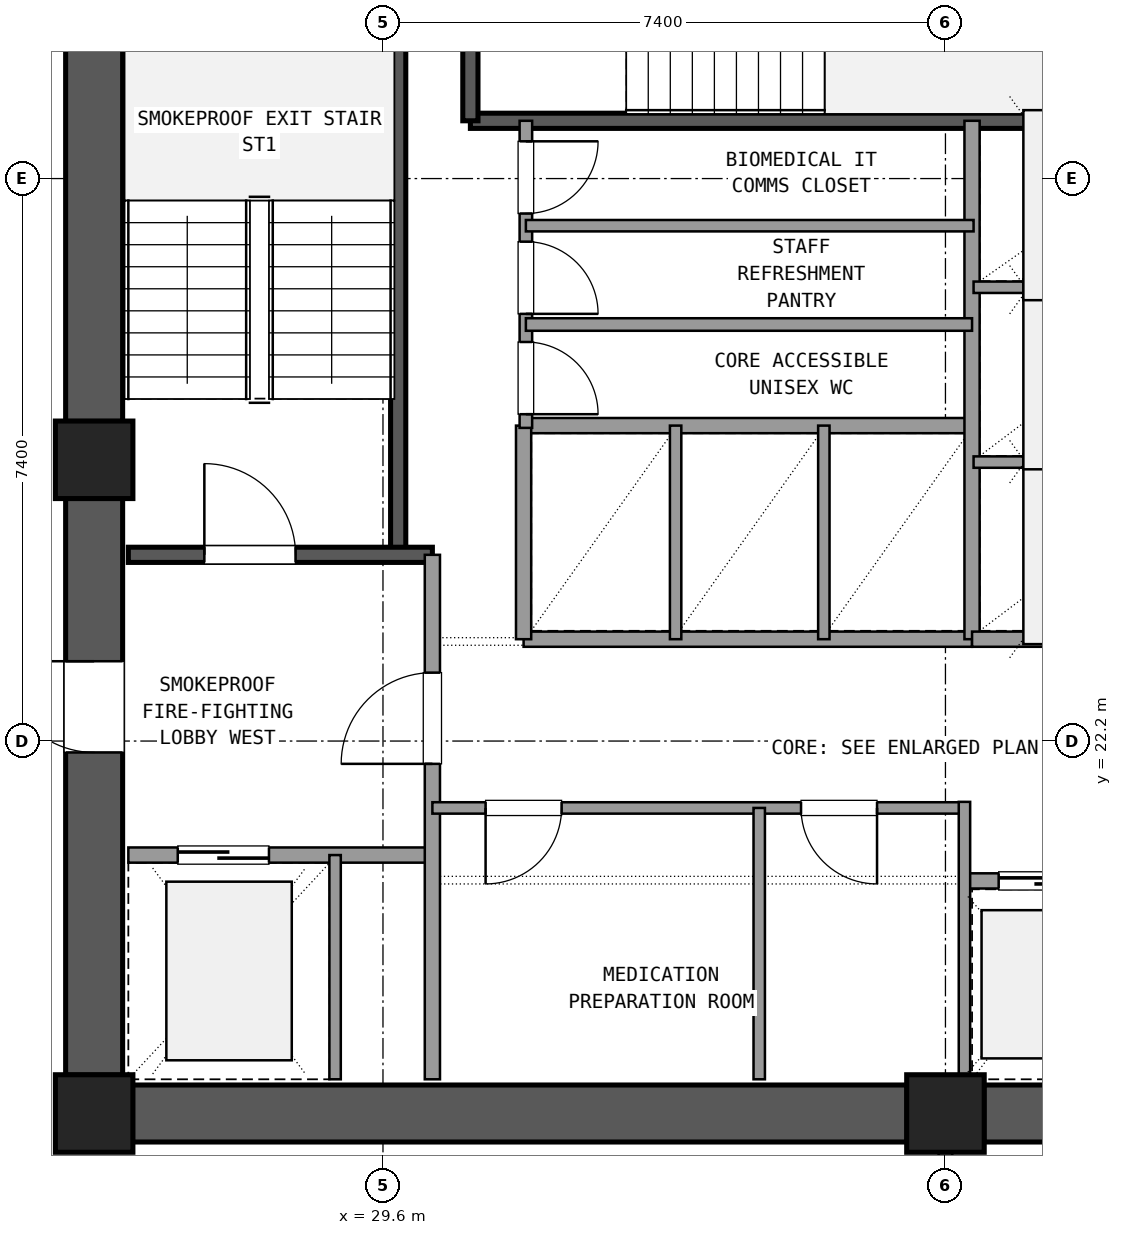
"""IFC4 building model, lengths in metres.
Left out: names, types, materials, properties, quantities, classifications, styles, units other than length and angle.
Written with IfcOpenShell. Run it as: python <this file> out.ifc"""

import sys

from ifc_helpers import new_model, si_unit, direction, frame, frame_2d, origin, origin_2d, place, context, subcontext, project, spatial, rectangle, extrude, element, fill, save


model = new_model("IFC4")
c1 = context("Model", 3, precision=1e-05, world=origin(), true_north=direction((0.0, 1.0)))
c2 = subcontext(c1, "Body", "Model", "MODEL_VIEW")
j1 = project(units=[si_unit("LENGTHUNIT", "METRE"), si_unit("PLANEANGLEUNIT", "RADIAN")], contexts=[c1])
p1 = place(None, origin())
s1 = spatial("IfcSite", under=j1, at=p1, CompositionType="ELEMENT")
p2 = place(p1, origin())
s2 = spatial("IfcBuilding", under=s1, at=p2, CompositionType="ELEMENT")
p3 = place(p2, frame((0.0, 0.0, 109.98)))
s3 = spatial("IfcBuildingStorey", under=s2, at=p3, CompositionType="ELEMENT", Elevation=109.98)
for number, where, z_axis, x_axis in (
    (1, (25.8, 17.3, 0.0), (0.0, 0.0, 1.0), (1.0, 0.0, 0.0)),
    (2, (37.0, 17.3, 0.0), (0.0, 0.0, 1.0), (1.0, 0.0, 0.0)),
    (3, (25.8, 25.9, 0.0), (0.0, 0.0, 1.0), (1.0, 0.0, 0.0)),
):
    element("IfcColumn", number, at=place(p3, frame(where, z_axis=z_axis, x_axis=x_axis)), inside=s3, PredefinedType="COLUMN", context=c2, shape_type="SweptSolid", body=[
        extrude(rectangle(XDim=1.02, YDim=1.02, at=origin_2d()), origin(), (0.0, 0.0, 1.0), 3.6),
    ])
for number, where, z_axis, x_axis in (
    (4, (26.305, 17.3, 0.0), (0.0, 0.0, 1.0), (1.0, 0.0, 0.0)),
    (5, (37.505, 17.3, 0.0), (0.0, 0.0, 1.0), (1.0, 0.0, 0.0)),
):
    element("IfcWall", number, at=place(p3, frame(where, z_axis=z_axis, x_axis=x_axis)), inside=s3, PredefinedType="SHEAR", context=c2, shape_type="SweptSolid", body=[
        extrude(rectangle(XDim=10.19, YDim=0.75, at=frame_2d((5.095, 0.0))), origin(), (0.0, 0.0, 1.0), 3.32),
    ])
p4 = place(p3, frame((25.8, 33.995, 0.0), z_axis=(0.0, 0.0, 1.0), x_axis=(0.0, -1.0, 0.0)))
e6 = element("IfcWall", 6, at=p4, inside=s3, PredefinedType="SHEAR", context=c2, shape_type="SweptSolid", body=[
    extrude(rectangle(XDim=7.59, YDim=0.75, at=frame_2d((3.795, 0.0))), origin(), (0.0, 0.0, 1.0), 3.32),
])
p5 = place(p3, frame((25.8, 25.395, 0.0), z_axis=(0.0, 0.0, 1.0), x_axis=(0.0, -1.0, 0.0)))
e7 = element("IfcWall", 7, at=p5, inside=s3, PredefinedType="SHEAR", context=c2, shape_type="SweptSolid", body=[
    extrude(rectangle(XDim=7.59, YDim=0.75, at=frame_2d((3.795, 0.0))), origin(), (0.0, 0.0, 1.0), 3.32),
])
p6 = place(p5, frame((2.145, 0.0, 0.0)))
e8 = element("IfcOpeningElement", 8, at=p6, cuts=e7, PredefinedType="OPENING", context=c2, shape_type="SweptSolid", body=[
    extrude(rectangle(XDim=1.2, YDim=2.15, at=frame_2d((0.6, 1.075))), frame((0.0, 0.385, 0.0), z_axis=(0.0, -1.0, 0.0), x_axis=(1.0, 0.0, 0.0)), (0.0, 0.0, 1.0), 0.77),
])
p7 = place(p3, frame((29.8, 24.65, 0.0), z_axis=(0.0, 0.0, 1.0), x_axis=(0.0, 1.0, 0.0)))
e9 = element("IfcWall", 9, at=p7, inside=s3, PredefinedType="SHEAR", context=c2, shape_type="SweptSolid", body=[
    extrude(rectangle(XDim=9.4, YDim=0.2, at=frame_2d((4.7, 0.0))), origin(), (0.0, 0.0, 1.0), 3.32),
])
p8 = place(p3, frame((26.25, 24.65, 0.0), z_axis=(0.0, 0.0, 1.0), x_axis=(1.0, 0.0, 0.0)))
e10 = element("IfcWall", 10, at=p8, inside=s3, PredefinedType="SHEAR", context=c2, shape_type="SweptSolid", body=[
    extrude(rectangle(XDim=4.0, YDim=0.2, at=frame_2d((2.0, 0.0))), origin(), (0.0, 0.0, 1.0), 3.32),
])
p9 = place(p8, frame((1.0, 0.0, 0.0)))
e11 = element("IfcOpeningElement", 11, at=p9, cuts=e10, PredefinedType="OPENING", context=c2, shape_type="SweptSolid", body=[
    extrude(rectangle(XDim=1.2, YDim=2.15, at=frame_2d((0.6, 1.075))), frame((0.0, 0.11, 0.0), z_axis=(0.0, -1.0, 0.0), x_axis=(1.0, 0.0, 0.0)), (0.0, 0.0, 1.0), 0.22),
])
p10 = place(p3, frame((30.75, 30.36, 0.0), z_axis=(0.0, 0.0, 1.0), x_axis=(1.0, 0.0, 0.0)))
e12 = element("IfcWall", 12, at=p10, inside=s3, PredefinedType="SHEAR", context=c2, shape_type="SweptSolid", body=[
    extrude(rectangle(XDim=9.5, YDim=0.2, at=frame_2d((4.75, 0.0))), origin(), (0.0, 0.0, 1.0), 3.32),
])
p11 = place(p3, frame((30.75, 30.36, 0.0), z_axis=(0.0, 0.0, 1.0), x_axis=(0.0, 1.0, 0.0)))
e13 = element("IfcWall", 13, at=p11, inside=s3, PredefinedType="SHEAR", context=c2, shape_type="SweptSolid", body=[
    extrude(rectangle(XDim=3.69, YDim=0.2, at=frame_2d((1.845, 0.0))), origin(), (0.0, 0.0, 1.0), 3.32),
])
p12 = place(p3, frame((26.25, 20.7, 0.0), z_axis=(0.0, 0.0, 1.0), x_axis=(1.0, 0.0, 0.0)))
e14 = element("IfcWall", 14, at=p12, inside=s3, PredefinedType="SOLIDWALL", context=c2, shape_type="SweptSolid", body=[
    extrude(rectangle(XDim=4.0, YDim=0.2, at=frame_2d((2.0, 0.0))), origin(), (0.0, 0.0, 1.0), 2.61),
])
p13 = place(p12, frame((0.65, 0.0, 0.0)))
e15 = element("IfcOpeningElement", 15, at=p13, cuts=e14, PredefinedType="OPENING", context=c2, shape_type="SweptSolid", body=[
    extrude(rectangle(XDim=1.2, YDim=2.15, at=frame_2d((0.6, 1.075))), frame((0.0, 0.11, 0.0), z_axis=(0.0, -1.0, 0.0), x_axis=(1.0, 0.0, 0.0)), (0.0, 0.0, 1.0), 0.22),
])
p14 = place(p3, frame((30.25, 17.75, 0.0), z_axis=(0.0, 0.0, 1.0), x_axis=(0.0, 1.0, 0.0)))
e16 = element("IfcWall", 16, at=p14, inside=s3, PredefinedType="SOLIDWALL", context=c2, shape_type="SweptSolid", body=[
    extrude(rectangle(XDim=6.9, YDim=0.2, at=frame_2d((3.45, 0.0))), origin(), (0.0, 0.0, 1.0), 2.61),
])
p15 = place(p14, frame((4.15, 0.0, 0.0)))
e17 = element("IfcOpeningElement", 17, at=p15, cuts=e16, PredefinedType="OPENING", context=c2, shape_type="SweptSolid", body=[
    extrude(rectangle(XDim=1.2, YDim=2.15, at=frame_2d((0.6, 1.075))), frame((0.0, 0.11, 0.0), z_axis=(0.0, -1.0, 0.0), x_axis=(1.0, 0.0, 0.0)), (0.0, 0.0, 1.0), 0.22),
])
p16 = place(p3, frame((28.97, 17.75, 0.0), z_axis=(0.0, 0.0, 1.0), x_axis=(0.0, 1.0, 0.0)))
e18 = element("IfcWall", 18, at=p16, inside=s3, PredefinedType="PARTITIONING", context=c2, shape_type="SweptSolid", body=[
    extrude(rectangle(XDim=2.95, YDim=0.15, at=frame_2d((1.475, 0.0))), origin(), (0.0, 0.0, 1.0), 2.61),
])
p17 = place(p3, frame((30.25, 21.32, 0.0), z_axis=(0.0, 0.0, 1.0), x_axis=(1.0, 0.0, 0.0)))
e19 = element("IfcWall", 19, at=p17, inside=s3, PredefinedType="PARTITIONING", context=c2, shape_type="SweptSolid", body=[
    extrude(rectangle(XDim=7.0, YDim=0.15, at=frame_2d((3.5, 0.0))), origin(), (0.0, 0.0, 1.0), 2.61),
])
p18 = place(p17, frame((0.7, 0.0, 0.0)))
e20 = element("IfcOpeningElement", 20, at=p18, cuts=e19, PredefinedType="OPENING", context=c2, shape_type="SweptSolid", body=[
    extrude(rectangle(XDim=1.0, YDim=2.15, at=frame_2d((0.5, 1.075))), frame((0.0, 0.085, 0.0), z_axis=(0.0, -1.0, 0.0), x_axis=(1.0, 0.0, 0.0)), (0.0, 0.0, 1.0), 0.17),
])
p19 = place(p17, frame((4.85, 0.0, 0.0)))
e21 = element("IfcOpeningElement", 21, at=p19, cuts=e19, PredefinedType="OPENING", context=c2, shape_type="SweptSolid", body=[
    extrude(rectangle(XDim=1.0, YDim=2.15, at=frame_2d((0.5, 1.075))), frame((0.0, 0.085, 0.0), z_axis=(0.0, -1.0, 0.0), x_axis=(1.0, 0.0, 0.0)), (0.0, 0.0, 1.0), 0.17),
])
p20 = place(p3, frame((34.55, 17.75, 0.0), z_axis=(0.0, 0.0, 1.0), x_axis=(0.0, 1.0, 0.0)))
e22 = element("IfcWall", 22, at=p20, inside=s3, PredefinedType="PARTITIONING", context=c2, shape_type="SweptSolid", body=[
    extrude(rectangle(XDim=3.57, YDim=0.15, at=frame_2d((1.785, 0.0))), origin(), (0.0, 0.0, 1.0), 2.61),
])
p21 = place(p3, frame((37.25, 20.36, 0.0), z_axis=(0.0, 0.0, 1.0), x_axis=(1.0, 0.0, 0.0)))
e23 = element("IfcWall", 23, at=p21, inside=s3, PredefinedType="SOLIDWALL", context=c2, shape_type="SweptSolid", body=[
    extrude(rectangle(XDim=6.1, YDim=0.2, at=frame_2d((3.05, 0.0))), origin(), (0.0, 0.0, 1.0), 2.61),
])
p22 = place(p21, frame((0.45, 0.0, 0.0)))
e24 = element("IfcOpeningElement", 24, at=p22, cuts=e23, PredefinedType="OPENING", context=c2, shape_type="SweptSolid", body=[
    extrude(rectangle(XDim=1.1, YDim=2.15, at=frame_2d((0.55, 1.075))), frame((0.0, 0.11, 0.0), z_axis=(0.0, -1.0, 0.0), x_axis=(1.0, 0.0, 0.0)), (0.0, 0.0, 1.0), 0.22),
])
p23 = place(p21, frame((2.5, 0.0, 0.0)))
e25 = element("IfcOpeningElement", 25, at=p23, cuts=e23, PredefinedType="OPENING", context=c2, shape_type="SweptSolid", body=[
    extrude(rectangle(XDim=1.1, YDim=2.15, at=frame_2d((0.55, 1.075))), frame((0.0, 0.11, 0.0), z_axis=(0.0, -1.0, 0.0), x_axis=(1.0, 0.0, 0.0)), (0.0, 0.0, 1.0), 0.22),
])
p24 = place(p21, frame((4.55, 0.0, 0.0)))
e26 = element("IfcOpeningElement", 26, at=p24, cuts=e23, PredefinedType="OPENING", context=c2, shape_type="SweptSolid", body=[
    extrude(rectangle(XDim=1.1, YDim=2.15, at=frame_2d((0.55, 1.075))), frame((0.0, 0.11, 0.0), z_axis=(0.0, -1.0, 0.0), x_axis=(1.0, 0.0, 0.0)), (0.0, 0.0, 1.0), 0.22),
])
p25 = place(p3, frame((37.25, 17.75, 0.0), z_axis=(0.0, 0.0, 1.0), x_axis=(0.0, 1.0, 0.0)))
e27 = element("IfcWall", 27, at=p25, inside=s3, PredefinedType="PARTITIONING", context=c2, shape_type="SweptSolid", body=[
    extrude(rectangle(XDim=3.65, YDim=0.15, at=frame_2d((1.825, 0.0))), origin(), (0.0, 0.0, 1.0), 2.61),
])
for number, where, z_axis, x_axis in (
    (28, (31.45, 23.54, 0.0), (0.0, 0.0, 1.0), (1.0, 0.0, 0.0)),
    (29, (31.45, 26.35, 0.0), (0.0, 0.0, 1.0), (1.0, 0.0, 0.0)),
):
    element("IfcWall", number, at=place(p3, frame(where, z_axis=z_axis, x_axis=x_axis)), inside=s3, PredefinedType="SOLIDWALL", context=c2, shape_type="SweptSolid", body=[
        extrude(rectangle(XDim=5.9, YDim=0.2, at=frame_2d((2.95, 0.0))), origin(), (0.0, 0.0, 1.0), 2.61),
    ])
p26 = place(p3, frame((31.45, 23.54, 0.0), z_axis=(0.0, 0.0, 1.0), x_axis=(0.0, 1.0, 0.0)))
e30 = element("IfcWall", 30, at=p26, inside=s3, PredefinedType="SOLIDWALL", context=c2, shape_type="SweptSolid", body=[
    extrude(rectangle(XDim=2.81, YDim=0.2, at=frame_2d((1.405, 0.0))), origin(), (0.0, 0.0, 1.0), 2.61),
])
for number, where, z_axis, x_axis in (
    (31, (33.45, 23.54, 0.0), (0.0, 0.0, 1.0), (0.0, 1.0, 0.0)),
    (32, (35.4, 23.54, 0.0), (0.0, 0.0, 1.0), (0.0, 1.0, 0.0)),
):
    element("IfcWall", number, at=place(p3, frame(where, z_axis=z_axis, x_axis=x_axis)), inside=s3, PredefinedType="PARTITIONING", context=c2, shape_type="SweptSolid", body=[
        extrude(rectangle(XDim=2.81, YDim=0.15, at=frame_2d((1.405, 0.0))), origin(), (0.0, 0.0, 1.0), 2.61),
    ])
p27 = place(p3, frame((37.35, 23.54, 0.0), z_axis=(0.0, 0.0, 1.0), x_axis=(0.0, 1.0, 0.0)))
e33 = element("IfcWall", 33, at=p27, inside=s3, PredefinedType="SOLIDWALL", context=c2, shape_type="SweptSolid", body=[
    extrude(rectangle(XDim=6.82, YDim=0.2, at=frame_2d((3.41, 0.0))), origin(), (0.0, 0.0, 1.0), 2.61),
])
p28 = place(p3, frame((37.35, 23.54, 0.0), z_axis=(0.0, 0.0, 1.0), x_axis=(1.0, 0.0, 0.0)))
e34 = element("IfcWall", 34, at=p28, inside=s3, PredefinedType="SOLIDWALL", context=c2, shape_type="SweptSolid", body=[
    extrude(rectangle(XDim=3.05, YDim=0.2, at=frame_2d((1.525, 0.0))), origin(), (0.0, 0.0, 1.0), 2.61),
])
for number, where, z_axis, x_axis in (
    (35, (37.37, 25.87, 0.0), (0.0, 0.0, 1.0), (1.0, 0.0, 0.0)),
    (36, (37.37, 28.17, 0.0), (0.0, 0.0, 1.0), (1.0, 0.0, 0.0)),
):
    element("IfcWall", number, at=place(p3, frame(where, z_axis=z_axis, x_axis=x_axis)), inside=s3, PredefinedType="PARTITIONING", context=c2, shape_type="SweptSolid", body=[
        extrude(rectangle(XDim=3.01, YDim=0.15, at=frame_2d((1.505, 0.0))), origin(), (0.0, 0.0, 1.0), 2.61),
    ])
p29 = place(p3, frame((31.48, 26.32, 0.0), z_axis=(0.0, 0.0, 1.0), x_axis=(0.0, 1.0, 0.0)))
e37 = element("IfcWall", 37, at=p29, inside=s3, PredefinedType="PLUMBINGWALL", context=c2, shape_type="SweptSolid", body=[
    extrude(rectangle(XDim=4.04, YDim=0.165, at=frame_2d((2.02, 0.0))), origin(), (0.0, 0.0, 1.0), 2.61),
])
p30 = place(p29, frame((0.18, 0.0, 0.0)))
e38 = element("IfcOpeningElement", 38, at=p30, cuts=e37, PredefinedType="OPENING", context=c2, shape_type="SweptSolid", body=[
    extrude(rectangle(XDim=0.95, YDim=2.1, at=frame_2d((0.475, 1.05))), frame((0.0, 0.093, 0.0), z_axis=(0.0, -1.0, 0.0), x_axis=(1.0, 0.0, 0.0)), (0.0, 0.0, 1.0), 0.185),
])
p31 = place(p29, frame((1.5, 0.0, 0.0)))
e39 = element("IfcOpeningElement", 39, at=p31, cuts=e37, PredefinedType="OPENING", context=c2, shape_type="SweptSolid", body=[
    extrude(rectangle(XDim=0.95, YDim=2.1, at=frame_2d((0.475, 1.05))), frame((0.0, 0.093, 0.0), z_axis=(0.0, -1.0, 0.0), x_axis=(1.0, 0.0, 0.0)), (0.0, 0.0, 1.0), 0.185),
])
p32 = place(p29, frame((2.82, 0.0, 0.0)))
e40 = element("IfcOpeningElement", 40, at=p32, cuts=e37, PredefinedType="OPENING", context=c2, shape_type="SweptSolid", body=[
    extrude(rectangle(XDim=0.95, YDim=2.1, at=frame_2d((0.475, 1.05))), frame((0.0, 0.093, 0.0), z_axis=(0.0, -1.0, 0.0), x_axis=(1.0, 0.0, 0.0)), (0.0, 0.0, 1.0), 0.185),
])
p33 = place(p3, frame((31.48, 27.68, 0.0), z_axis=(0.0, 0.0, 1.0), x_axis=(1.0, 0.0, 0.0)))
e41 = element("IfcWall", 41, at=p33, inside=s3, PredefinedType="PLUMBINGWALL", context=c2, shape_type="SweptSolid", body=[
    extrude(rectangle(XDim=5.87, YDim=0.165, at=frame_2d((2.935, 0.0))), origin(), (0.0, 0.0, 1.0), 2.61),
])
p34 = place(p3, frame((31.48, 28.98, 0.0), z_axis=(0.0, 0.0, 1.0), x_axis=(1.0, 0.0, 0.0)))
e42 = element("IfcWall", 42, at=p34, inside=s3, PredefinedType="PARTITIONING", context=c2, shape_type="SweptSolid", body=[
    extrude(rectangle(XDim=5.89, YDim=0.15, at=frame_2d((2.945, 0.0))), origin(), (0.0, 0.0, 1.0), 2.61),
])
p35 = place(p3, frame((37.0, 13.64, 0.0), z_axis=(0.0, 0.0, 1.0), x_axis=(0.0, 1.0, 0.0)))
e43 = element("IfcWall", 43, at=p35, inside=s3, PredefinedType="PARTITIONING", context=c2, shape_type="SweptSolid", body=[
    extrude(rectangle(XDim=3.21, YDim=0.18, at=frame_2d((1.605, 0.0))), origin(), (0.0, 0.0, 1.0), 2.61),
])
p36 = place(p35, frame((0.605, 0.0, 0.0)))
e44 = element("IfcOpeningElement", 44, at=p36, cuts=e43, PredefinedType="OPENING", context=c2, shape_type="SweptSolid", body=[
    extrude(rectangle(XDim=2.0, YDim=2.2, at=frame_2d((1.0, 1.1))), frame((0.0, 0.1, 0.0), z_axis=(0.0, -1.0, 0.0), x_axis=(1.0, 0.0, 0.0)), (0.0, 0.0, 1.0), 0.2),
])
p37 = place(p9, origin())
e45 = element("IfcDoor", 45, at=p37, inside=s3, OperationType="SINGLE_SWING_LEFT", PredefinedType="DOOR", context=c2, shape_type="SweptSolid", body=[
    extrude(rectangle(XDim=1.2, YDim=2.15, at=frame_2d((0.6, 1.075))), frame((0.0, 0.025, 0.0), z_axis=(0.0, -1.0, 0.0), x_axis=(1.0, 0.0, 0.0)), (0.0, 0.0, 1.0), 0.05),
])
fill(e11, e45)
p38 = place(p13, origin())
e46 = element("IfcDoor", 46, at=p38, inside=s3, OperationType="SLIDING_TO_LEFT", PredefinedType="DOOR", context=c2, shape_type="SweptSolid", body=[
    extrude(rectangle(XDim=1.2, YDim=2.15, at=frame_2d((0.6, 1.075))), frame((0.0, 0.025, 0.0), z_axis=(0.0, -1.0, 0.0), x_axis=(1.0, 0.0, 0.0)), (0.0, 0.0, 1.0), 0.05),
])
fill(e15, e46)
p39 = place(p15, origin())
e47 = element("IfcDoor", 47, at=p39, inside=s3, OperationType="SINGLE_SWING_LEFT", PredefinedType="DOOR", context=c2, shape_type="SweptSolid", body=[
    extrude(rectangle(XDim=1.2, YDim=2.15, at=frame_2d((0.6, 1.075))), frame((0.0, 0.025, 0.0), z_axis=(0.0, -1.0, 0.0), x_axis=(1.0, 0.0, 0.0)), (0.0, 0.0, 1.0), 0.05),
])
fill(e17, e47)
p40 = place(p6, frame((1.2, 0.0, 0.0), z_axis=(0.0, 0.0, 1.0), x_axis=(-1.0, 0.0, 0.0)))
e48 = element("IfcDoor", 48, at=p40, inside=s3, OperationType="SINGLE_SWING_LEFT", PredefinedType="DOOR", context=c2, shape_type="SweptSolid", body=[
    extrude(rectangle(XDim=1.2, YDim=2.15, at=frame_2d((0.6, 1.075))), frame((0.0, 0.025, 0.0), z_axis=(0.0, -1.0, 0.0), x_axis=(1.0, 0.0, 0.0)), (0.0, 0.0, 1.0), 0.05),
])
fill(e8, e48)
p41 = place(p18, frame((1.0, 0.0, 0.0), z_axis=(0.0, 0.0, 1.0), x_axis=(-1.0, 0.0, 0.0)))
e49 = element("IfcDoor", 49, at=p41, inside=s3, OperationType="SINGLE_SWING_LEFT", PredefinedType="DOOR", context=c2, shape_type="SweptSolid", body=[
    extrude(rectangle(XDim=1.0, YDim=2.15, at=frame_2d((0.5, 1.075))), frame((0.0, 0.025, 0.0), z_axis=(0.0, -1.0, 0.0), x_axis=(1.0, 0.0, 0.0)), (0.0, 0.0, 1.0), 0.05),
])
fill(e20, e49)
p42 = place(p19, frame((1.0, 0.0, 0.0), z_axis=(0.0, 0.0, 1.0), x_axis=(-1.0, 0.0, 0.0)))
e50 = element("IfcDoor", 50, at=p42, inside=s3, OperationType="SINGLE_SWING_RIGHT", PredefinedType="DOOR", context=c2, shape_type="SweptSolid", body=[
    extrude(rectangle(XDim=1.0, YDim=2.15, at=frame_2d((0.5, 1.075))), frame((0.0, 0.025, 0.0), z_axis=(0.0, -1.0, 0.0), x_axis=(1.0, 0.0, 0.0)), (0.0, 0.0, 1.0), 0.05),
])
fill(e21, e50)
p43 = place(p22, origin())
e51 = element("IfcDoor", 51, at=p43, inside=s3, OperationType="SLIDING_TO_LEFT", PredefinedType="DOOR", context=c2, shape_type="SweptSolid", body=[
    extrude(rectangle(XDim=1.1, YDim=2.15, at=frame_2d((0.55, 1.075))), frame((0.0, 0.025, 0.0), z_axis=(0.0, -1.0, 0.0), x_axis=(1.0, 0.0, 0.0)), (0.0, 0.0, 1.0), 0.05),
])
fill(e24, e51)
p44 = place(p30, frame((0.95, 0.0, 0.0), z_axis=(0.0, 0.0, 1.0), x_axis=(-1.0, 0.0, 0.0)))
e52 = element("IfcDoor", 52, at=p44, inside=s3, OperationType="SINGLE_SWING_LEFT", PredefinedType="DOOR", context=c2, shape_type="SweptSolid", body=[
    extrude(rectangle(XDim=0.95, YDim=2.1, at=frame_2d((0.475, 1.05))), frame((0.0, 0.025, 0.0), z_axis=(0.0, -1.0, 0.0), x_axis=(1.0, 0.0, 0.0)), (0.0, 0.0, 1.0), 0.05),
])
fill(e38, e52)
p45 = place(p31, frame((0.95, 0.0, 0.0), z_axis=(0.0, 0.0, 1.0), x_axis=(-1.0, 0.0, 0.0)))
e53 = element("IfcDoor", 53, at=p45, inside=s3, OperationType="SINGLE_SWING_LEFT", PredefinedType="DOOR", context=c2, shape_type="SweptSolid", body=[
    extrude(rectangle(XDim=0.95, YDim=2.1, at=frame_2d((0.475, 1.05))), frame((0.0, 0.025, 0.0), z_axis=(0.0, -1.0, 0.0), x_axis=(1.0, 0.0, 0.0)), (0.0, 0.0, 1.0), 0.05),
])
fill(e39, e53)
p46 = place(p32, frame((0.95, 0.0, 0.0), z_axis=(0.0, 0.0, 1.0), x_axis=(-1.0, 0.0, 0.0)))
e54 = element("IfcDoor", 54, at=p46, inside=s3, OperationType="SINGLE_SWING_RIGHT", PredefinedType="DOOR", context=c2, shape_type="SweptSolid", body=[
    extrude(rectangle(XDim=0.95, YDim=2.1, at=frame_2d((0.475, 1.05))), frame((0.0, 0.025, 0.0), z_axis=(0.0, -1.0, 0.0), x_axis=(1.0, 0.0, 0.0)), (0.0, 0.0, 1.0), 0.05),
])
fill(e40, e54)
save(model, sys.argv[1])
